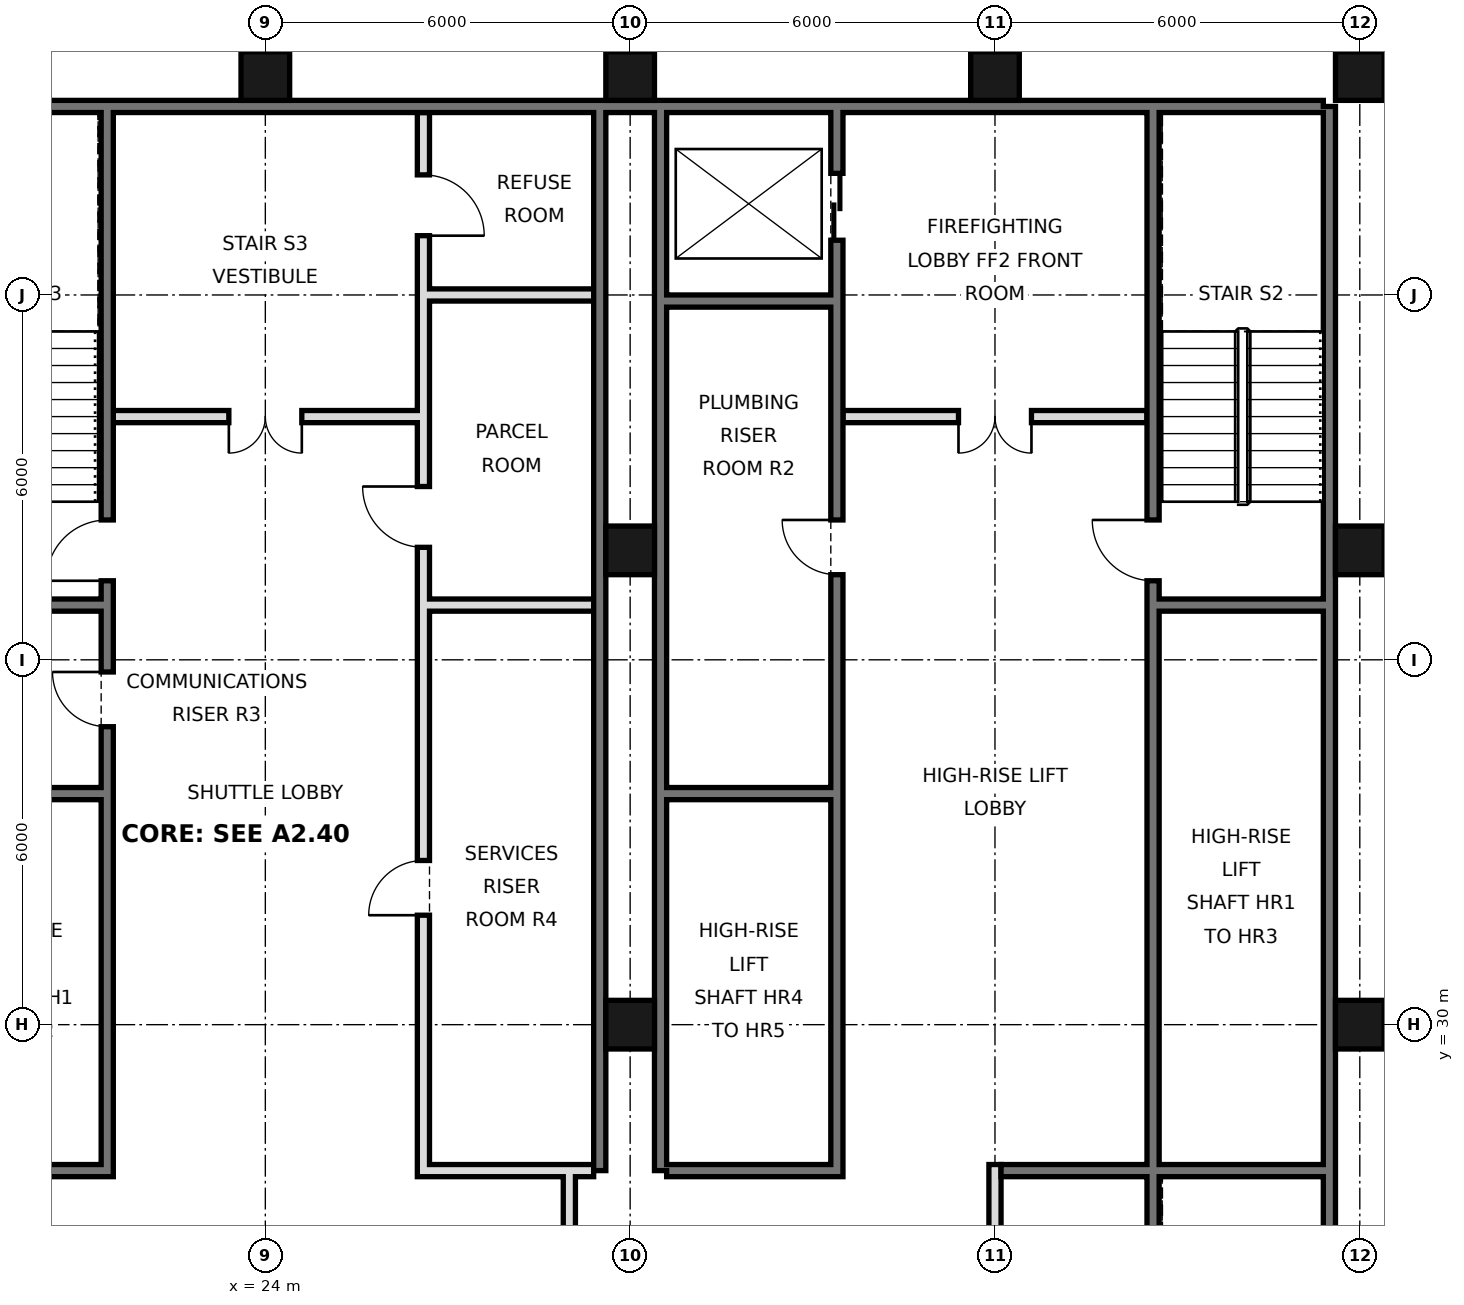
"""IFC4 building model, lengths in metres.
Left out: names, types, materials, properties, quantities, classifications, styles, units other than length and angle.
Written with IfcOpenShell. Run it as: python <this file> out.ifc"""

import sys

from ifc_helpers import new_model, si_unit, direction, frame, frame_2d, origin, origin_2d, place, context, subcontext, project, spatial, rectangle, hollow_rectangle, extrude, element, fill, save


model = new_model("IFC4")
c1 = context("Model", 3, precision=1e-05, world=origin(), true_north=direction((0.0, 1.0)))
c2 = subcontext(c1, "Body", "Model", "MODEL_VIEW")
j1 = project(units=[si_unit("LENGTHUNIT", "METRE"), si_unit("PLANEANGLEUNIT", "RADIAN")], contexts=[c1])
p1 = place(None, origin())
s1 = spatial("IfcSite", under=j1, at=p1, CompositionType="ELEMENT")
p2 = place(p1, origin())
s2 = spatial("IfcBuilding", under=s1, at=p2, CompositionType="ELEMENT")
p3 = place(p2, frame((0.0, 0.0, 158.2)))
s3 = spatial("IfcBuildingStorey", under=s2, at=p3, CompositionType="ELEMENT", Elevation=158.2)
for number, where, z_axis, x_axis in (
    (1, (24.0, 45.6, 0.0), (0.0, 0.0, 1.0), (1.0, 0.0, 0.0)),
    (2, (30.0, 30.0, 0.0), (0.0, 0.0, 1.0), (1.0, 0.0, 0.0)),
    (3, (30.0, 37.8, 0.0), (0.0, 0.0, 1.0), (1.0, 0.0, 0.0)),
    (4, (30.0, 45.6, 0.0), (0.0, 0.0, 1.0), (1.0, 0.0, 0.0)),
    (5, (36.0, 45.6, 0.0), (0.0, 0.0, 1.0), (1.0, 0.0, 0.0)),
    (6, (42.0, 30.0, 0.0), (0.0, 0.0, 1.0), (1.0, 0.0, 0.0)),
    (7, (42.0, 37.8, 0.0), (0.0, 0.0, 1.0), (1.0, 0.0, 0.0)),
    (8, (42.0, 45.6, 0.0), (0.0, 0.0, 1.0), (1.0, 0.0, 0.0)),
):
    element("IfcColumn", number, at=place(p3, frame(where, z_axis=z_axis, x_axis=x_axis)), inside=s3, PredefinedType="COLUMN", context=c2, shape_type="SweptSolid", body=[
        extrude(hollow_rectangle(XDim=0.8, YDim=0.8, WallThickness=0.045, at=origin_2d()), origin(), (0.0, 0.0, 1.0), 3.6),
    ])
p4 = place(p3, frame((41.5, 21.6, 0.0), z_axis=(0.0, 0.0, 1.0), x_axis=(0.0, 1.0, 0.0)))
e9 = element("IfcWall", 9, at=p4, inside=s3, PredefinedType="SOLIDWALL", context=c2, shape_type="SweptSolid", body=[
    extrude(rectangle(XDim=23.5, YDim=0.2, at=frame_2d((11.75, 0.0))), origin(), (0.0, 0.0, 1.0), 3.38),
])
p5 = place(p3, frame((6.6, 45.1, 0.0), z_axis=(0.0, 0.0, 1.0), x_axis=(1.0, 0.0, 0.0)))
e10 = element("IfcWall", 10, at=p5, inside=s3, PredefinedType="SOLIDWALL", context=c2, shape_type="SweptSolid", body=[
    extrude(rectangle(XDim=34.8, YDim=0.2, at=frame_2d((17.4, 0.0))), origin(), (0.0, 0.0, 1.0), 3.38),
])
for number, where, z_axis, x_axis in (
    (11, (29.5, 27.6, 0.0), (0.0, 0.0, 1.0), (0.0, 1.0, 0.0)),
    (12, (30.5, 27.6, 0.0), (0.0, 0.0, 1.0), (0.0, 1.0, 0.0)),
):
    element("IfcWall", number, at=place(p3, frame(where, z_axis=z_axis, x_axis=x_axis)), inside=s3, PredefinedType="SOLIDWALL", context=c2, shape_type="SweptSolid", body=[
        extrude(rectangle(XDim=17.5, YDim=0.2, at=frame_2d((8.75, 0.0))), origin(), (0.0, 0.0, 1.0), 3.38),
    ])
p6 = place(p3, frame((29.0, 21.6, 0.0), z_axis=(0.0, 0.0, 1.0), x_axis=(0.0, 1.0, 0.0)))
e13 = element("IfcWall", 13, at=p6, inside=s3, PredefinedType="PARTITIONING", context=c2, shape_type="SweptSolid", body=[
    extrude(rectangle(XDim=6.0, YDim=0.2, at=frame_2d((3.0, 0.0))), origin(), (0.0, 0.0, 1.0), 3.38),
])
p7 = place(p6, frame((2.1, 0.0, 0.0)))
e14 = element("IfcOpeningElement", 14, at=p7, cuts=e13, PredefinedType="OPENING", context=c2, shape_type="SweptSolid", body=[
    extrude(rectangle(XDim=1.8, YDim=2.1, at=frame_2d((0.9, 1.05))), frame((0.0, 0.11, 0.0), z_axis=(0.0, -1.0, 0.0), x_axis=(1.0, 0.0, 0.0)), (0.0, 0.0, 1.0), 0.22),
])
p8 = place(p3, frame((21.4, 27.5, 0.0), z_axis=(0.0, 0.0, 1.0), x_axis=(0.0, 1.0, 0.0)))
e15 = element("IfcWall", 15, at=p8, inside=s3, PredefinedType="SOLIDWALL", context=c2, shape_type="SweptSolid", body=[
    extrude(rectangle(XDim=17.5, YDim=0.2, at=frame_2d((8.75, 0.0))), origin(), (0.0, 0.0, 1.0), 3.38),
])
p9 = place(p8, frame((9.8, 0.0, 0.0)))
e16 = element("IfcOpeningElement", 16, at=p9, cuts=e15, PredefinedType="OPENING", context=c2, shape_type="SweptSolid", body=[
    extrude(rectangle(XDim=1.0, YDim=2.1, at=frame_2d((0.5, 1.05))), frame((0.0, 0.11, 0.0), z_axis=(0.0, -1.0, 0.0), x_axis=(1.0, 0.0, 0.0)), (0.0, 0.0, 1.0), 0.22),
])
p10 = place(p8, frame((7.4, 0.0, 0.0)))
e17 = element("IfcOpeningElement", 17, at=p10, cuts=e15, PredefinedType="OPENING", context=c2, shape_type="SweptSolid", body=[
    extrude(rectangle(XDim=0.9, YDim=2.1, at=frame_2d((0.45, 1.05))), frame((0.0, 0.11, 0.0), z_axis=(0.0, -1.0, 0.0), x_axis=(1.0, 0.0, 0.0)), (0.0, 0.0, 1.0), 0.22),
])
p11 = place(p3, frame((26.6, 27.5, 0.0), z_axis=(0.0, 0.0, 1.0), x_axis=(0.0, 1.0, 0.0)))
e18 = element("IfcWall", 18, at=p11, inside=s3, PredefinedType="SOLIDWALL", context=c2, shape_type="SweptSolid", body=[
    extrude(rectangle(XDim=17.5, YDim=0.2, at=frame_2d((8.75, 0.0))), origin(), (0.0, 0.0, 1.0), 3.38),
])
p12 = place(p11, frame((4.3, 0.0, 0.0)))
e19 = element("IfcOpeningElement", 19, at=p12, cuts=e18, PredefinedType="OPENING", context=c2, shape_type="SweptSolid", body=[
    extrude(rectangle(XDim=0.9, YDim=2.1, at=frame_2d((0.45, 1.05))), frame((0.0, 0.11, 0.0), z_axis=(0.0, -1.0, 0.0), x_axis=(1.0, 0.0, 0.0)), (0.0, 0.0, 1.0), 0.22),
])
p13 = place(p11, frame((10.35, 0.0, 0.0)))
e20 = element("IfcOpeningElement", 20, at=p13, cuts=e18, PredefinedType="OPENING", context=c2, shape_type="SweptSolid", body=[
    extrude(rectangle(XDim=1.0, YDim=2.1, at=frame_2d((0.5, 1.05))), frame((0.0, 0.11, 0.0), z_axis=(0.0, -1.0, 0.0), x_axis=(1.0, 0.0, 0.0)), (0.0, 0.0, 1.0), 0.22),
])
p14 = place(p11, frame((15.475, 0.0, 0.0)))
e21 = element("IfcOpeningElement", 21, at=p14, cuts=e18, PredefinedType="OPENING", context=c2, shape_type="SweptSolid", body=[
    extrude(rectangle(XDim=1.0, YDim=2.1, at=frame_2d((0.5, 1.05))), frame((0.0, 0.11, 0.0), z_axis=(0.0, -1.0, 0.0), x_axis=(1.0, 0.0, 0.0)), (0.0, 0.0, 1.0), 0.22),
])
p15 = place(p3, frame((33.4, 27.5, 0.0), z_axis=(0.0, 0.0, 1.0), x_axis=(0.0, 1.0, 0.0)))
e22 = element("IfcWall", 22, at=p15, inside=s3, PredefinedType="SOLIDWALL", context=c2, shape_type="SweptSolid", body=[
    extrude(rectangle(XDim=17.5, YDim=0.2, at=frame_2d((8.75, 0.0))), origin(), (0.0, 0.0, 1.0), 3.38),
])
p16 = place(p15, frame((15.4, 0.0, 0.0)))
e23 = element("IfcOpeningElement", 23, at=p16, cuts=e22, PredefinedType="OPENING", context=c2, shape_type="SweptSolid", body=[
    extrude(rectangle(XDim=1.1, YDim=2.1, at=frame_2d((0.55, 1.05))), frame((0.0, 0.11, 0.0), z_axis=(0.0, -1.0, 0.0), x_axis=(1.0, 0.0, 0.0)), (0.0, 0.0, 1.0), 0.22),
])
p17 = place(p15, frame((9.9, 0.0, 0.0)))
e24 = element("IfcOpeningElement", 24, at=p17, cuts=e22, PredefinedType="OPENING", context=c2, shape_type="SweptSolid", body=[
    extrude(rectangle(XDim=0.9, YDim=2.1, at=frame_2d((0.45, 1.05))), frame((0.0, 0.11, 0.0), z_axis=(0.0, -1.0, 0.0), x_axis=(1.0, 0.0, 0.0)), (0.0, 0.0, 1.0), 0.22),
])
p18 = place(p3, frame((36.0, 21.6, 0.0), z_axis=(0.0, 0.0, 1.0), x_axis=(0.0, 1.0, 0.0)))
e25 = element("IfcWall", 25, at=p18, inside=s3, PredefinedType="PARTITIONING", context=c2, shape_type="SweptSolid", body=[
    extrude(rectangle(XDim=6.1, YDim=0.2, at=frame_2d((3.05, 0.0))), origin(), (0.0, 0.0, 1.0), 3.38),
])
p19 = place(p3, frame((38.6, 21.6, 0.0), z_axis=(0.0, 0.0, 1.0), x_axis=(0.0, 1.0, 0.0)))
e26 = element("IfcWall", 26, at=p19, inside=s3, PredefinedType="SOLIDWALL", context=c2, shape_type="SweptSolid", body=[
    extrude(rectangle(XDim=23.4, YDim=0.2, at=frame_2d((11.7, 0.0))), origin(), (0.0, 0.0, 1.0), 3.38),
])
p20 = place(p19, frame((15.7, 0.0, 0.0)))
e27 = element("IfcOpeningElement", 27, at=p20, cuts=e26, PredefinedType="OPENING", context=c2, shape_type="SweptSolid", body=[
    extrude(rectangle(XDim=1.0, YDim=2.1, at=frame_2d((0.5, 1.05))), frame((0.0, 0.11, 0.0), z_axis=(0.0, -1.0, 0.0), x_axis=(1.0, 0.0, 0.0)), (0.0, 0.0, 1.0), 0.22),
])
p21 = place(p19, frame((0.175, 0.0, 0.0)))
e28 = element("IfcOpeningElement", 28, at=p21, cuts=e26, PredefinedType="OPENING", context=c2, shape_type="SweptSolid", body=[
    extrude(rectangle(XDim=0.9, YDim=2.1, at=frame_2d((0.45, 1.05))), frame((0.0, 0.11, 0.0), z_axis=(0.0, -1.0, 0.0), x_axis=(1.0, 0.0, 0.0)), (0.0, 0.0, 1.0), 0.22),
])
for number, where, z_axis, x_axis in (
    (29, (18.6, 27.6, 0.0), (0.0, 0.0, 1.0), (1.0, 0.0, 0.0)),
    (30, (26.7, 27.6, 0.0), (0.0, 0.0, 1.0), (1.0, 0.0, 0.0)),
    (31, (30.6, 27.6, 0.0), (0.0, 0.0, 1.0), (1.0, 0.0, 0.0)),
):
    element("IfcWall", number, at=place(p3, frame(where, z_axis=z_axis, x_axis=x_axis)), inside=s3, PredefinedType="SOLIDWALL", context=c2, shape_type="SweptSolid", body=[
        extrude(rectangle(XDim=2.7, YDim=0.2, at=frame_2d((1.35, 0.0))), origin(), (0.0, 0.0, 1.0), 3.38),
    ])
p22 = place(p3, frame((36.1, 27.6, 0.0), z_axis=(0.0, 0.0, 1.0), x_axis=(1.0, 0.0, 0.0)))
e32 = element("IfcWall", 32, at=p22, inside=s3, PredefinedType="SOLIDWALL", context=c2, shape_type="SweptSolid", body=[
    extrude(rectangle(XDim=5.3, YDim=0.2, at=frame_2d((2.65, 0.0))), origin(), (0.0, 0.0, 1.0), 3.38),
])
for number, where, z_axis, x_axis in (
    (33, (18.6, 33.8, 0.0), (0.0, 0.0, 1.0), (1.0, 0.0, 0.0)),
    (34, (30.6, 33.8, 0.0), (0.0, 0.0, 1.0), (1.0, 0.0, 0.0)),
    (35, (18.6, 36.9, 0.0), (0.0, 0.0, 1.0), (1.0, 0.0, 0.0)),
    (36, (26.7, 36.9, 0.0), (0.0, 0.0, 1.0), (1.0, 0.0, 0.0)),
    (37, (38.7, 36.9, 0.0), (0.0, 0.0, 1.0), (1.0, 0.0, 0.0)),
):
    element("IfcWall", number, at=place(p3, frame(where, z_axis=z_axis, x_axis=x_axis)), inside=s3, PredefinedType="SOLIDWALL", context=c2, shape_type="SweptSolid", body=[
        extrude(rectangle(XDim=2.7, YDim=0.2, at=frame_2d((1.35, 0.0))), origin(), (0.0, 0.0, 1.0), 3.38),
    ])
p23 = place(p3, frame((21.5, 40.0, 0.0), z_axis=(0.0, 0.0, 1.0), x_axis=(1.0, 0.0, 0.0)))
e38 = element("IfcWall", 38, at=p23, inside=s3, PredefinedType="PARTITIONING", context=c2, shape_type="SweptSolid", body=[
    extrude(rectangle(XDim=5.0, YDim=0.2, at=frame_2d((2.5, 0.0))), origin(), (0.0, 0.0, 1.0), 3.38),
])
p24 = place(p23, frame((1.9, 0.0, 0.0)))
e39 = element("IfcOpeningElement", 39, at=p24, cuts=e38, PredefinedType="OPENING", context=c2, shape_type="SweptSolid", body=[
    extrude(rectangle(XDim=1.2, YDim=2.1, at=frame_2d((0.6, 1.05))), frame((0.0, 0.11, 0.0), z_axis=(0.0, -1.0, 0.0), x_axis=(1.0, 0.0, 0.0)), (0.0, 0.0, 1.0), 0.22),
])
p25 = place(p3, frame((33.5, 40.0, 0.0), z_axis=(0.0, 0.0, 1.0), x_axis=(1.0, 0.0, 0.0)))
e40 = element("IfcWall", 40, at=p25, inside=s3, PredefinedType="PARTITIONING", context=c2, shape_type="SweptSolid", body=[
    extrude(rectangle(XDim=5.0, YDim=0.2, at=frame_2d((2.5, 0.0))), origin(), (0.0, 0.0, 1.0), 3.38),
])
p26 = place(p25, frame((1.9, 0.0, 0.0)))
e41 = element("IfcOpeningElement", 41, at=p26, cuts=e40, PredefinedType="OPENING", context=c2, shape_type="SweptSolid", body=[
    extrude(rectangle(XDim=1.2, YDim=2.1, at=frame_2d((0.6, 1.05))), frame((0.0, 0.11, 0.0), z_axis=(0.0, -1.0, 0.0), x_axis=(1.0, 0.0, 0.0)), (0.0, 0.0, 1.0), 0.22),
])
p27 = place(p3, frame((30.6, 41.9, 0.0), z_axis=(0.0, 0.0, 1.0), x_axis=(1.0, 0.0, 0.0)))
e42 = element("IfcWall", 42, at=p27, inside=s3, PredefinedType="SOLIDWALL", context=c2, shape_type="SweptSolid", body=[
    extrude(rectangle(XDim=2.7, YDim=0.2, at=frame_2d((1.35, 0.0))), origin(), (0.0, 0.0, 1.0), 3.38),
])
p28 = place(p3, frame((26.7, 42.0, 0.0), z_axis=(0.0, 0.0, 1.0), x_axis=(1.0, 0.0, 0.0)))
e43 = element("IfcWall", 43, at=p28, inside=s3, PredefinedType="PARTITIONING", context=c2, shape_type="SweptSolid", body=[
    extrude(rectangle(XDim=2.7, YDim=0.2, at=frame_2d((1.35, 0.0))), origin(), (0.0, 0.0, 1.0), 3.38),
])
p29 = place(p24, frame((1.2, 0.0, 0.0), z_axis=(0.0, 0.0, 1.0), x_axis=(-1.0, 0.0, 0.0)))
e44 = element("IfcDoor", 44, at=p29, inside=s3, OperationType="DOUBLE_DOOR_SINGLE_SWING", PredefinedType="DOOR", context=c2, shape_type="SweptSolid", body=[
    extrude(rectangle(XDim=1.2, YDim=2.1, at=frame_2d((0.6, 1.05))), frame((0.0, 0.025, 0.0), z_axis=(0.0, -1.0, 0.0), x_axis=(1.0, 0.0, 0.0)), (0.0, 0.0, 1.0), 0.05),
])
fill(e39, e44)
p30 = place(p26, frame((1.2, 0.0, 0.0), z_axis=(0.0, 0.0, 1.0), x_axis=(-1.0, 0.0, 0.0)))
e45 = element("IfcDoor", 45, at=p30, inside=s3, OperationType="DOUBLE_DOOR_SINGLE_SWING", PredefinedType="DOOR", context=c2, shape_type="SweptSolid", body=[
    extrude(rectangle(XDim=1.2, YDim=2.1, at=frame_2d((0.6, 1.05))), frame((0.0, 0.025, 0.0), z_axis=(0.0, -1.0, 0.0), x_axis=(1.0, 0.0, 0.0)), (0.0, 0.0, 1.0), 0.05),
])
fill(e41, e45)
p31 = place(p16, origin())
e46 = element("IfcDoor", 46, at=p31, inside=s3, OperationType="DOUBLE_DOOR_SLIDING", PredefinedType="DOOR", context=c2, shape_type="SweptSolid", body=[
    extrude(rectangle(XDim=1.1, YDim=2.1, at=frame_2d((0.55, 1.05))), frame((0.0, 0.025, 0.0), z_axis=(0.0, -1.0, 0.0), x_axis=(1.0, 0.0, 0.0)), (0.0, 0.0, 1.0), 0.05),
])
fill(e23, e46)
p32 = place(p20, frame((1.0, 0.0, 0.0), z_axis=(0.0, 0.0, 1.0), x_axis=(-1.0, 0.0, 0.0)))
e47 = element("IfcDoor", 47, at=p32, inside=s3, OperationType="SINGLE_SWING_LEFT", PredefinedType="DOOR", context=c2, shape_type="SweptSolid", body=[
    extrude(rectangle(XDim=1.0, YDim=2.1, at=frame_2d((0.5, 1.05))), frame((0.0, 0.025, 0.0), z_axis=(0.0, -1.0, 0.0), x_axis=(1.0, 0.0, 0.0)), (0.0, 0.0, 1.0), 0.05),
])
fill(e27, e47)
p33 = place(p9, origin())
e48 = element("IfcDoor", 48, at=p33, inside=s3, OperationType="SINGLE_SWING_LEFT", PredefinedType="DOOR", context=c2, shape_type="SweptSolid", body=[
    extrude(rectangle(XDim=1.0, YDim=2.1, at=frame_2d((0.5, 1.05))), frame((0.0, 0.025, 0.0), z_axis=(0.0, -1.0, 0.0), x_axis=(1.0, 0.0, 0.0)), (0.0, 0.0, 1.0), 0.05),
])
fill(e16, e48)
p34 = place(p17, frame((0.9, 0.0, 0.0), z_axis=(0.0, 0.0, 1.0), x_axis=(-1.0, 0.0, 0.0)))
e49 = element("IfcDoor", 49, at=p34, inside=s3, OperationType="SINGLE_SWING_LEFT", PredefinedType="DOOR", context=c2, shape_type="SweptSolid", body=[
    extrude(rectangle(XDim=0.9, YDim=2.1, at=frame_2d((0.45, 1.05))), frame((0.0, 0.025, 0.0), z_axis=(0.0, -1.0, 0.0), x_axis=(1.0, 0.0, 0.0)), (0.0, 0.0, 1.0), 0.05),
])
fill(e24, e49)
p35 = place(p10, frame((0.9, 0.0, 0.0), z_axis=(0.0, 0.0, 1.0), x_axis=(-1.0, 0.0, 0.0)))
e50 = element("IfcDoor", 50, at=p35, inside=s3, OperationType="SINGLE_SWING_LEFT", PredefinedType="DOOR", context=c2, shape_type="SweptSolid", body=[
    extrude(rectangle(XDim=0.9, YDim=2.1, at=frame_2d((0.45, 1.05))), frame((0.0, 0.025, 0.0), z_axis=(0.0, -1.0, 0.0), x_axis=(1.0, 0.0, 0.0)), (0.0, 0.0, 1.0), 0.05),
])
fill(e17, e50)
p36 = place(p12, origin())
e51 = element("IfcDoor", 51, at=p36, inside=s3, OperationType="SINGLE_SWING_LEFT", PredefinedType="DOOR", context=c2, shape_type="SweptSolid", body=[
    extrude(rectangle(XDim=0.9, YDim=2.1, at=frame_2d((0.45, 1.05))), frame((0.0, 0.025, 0.0), z_axis=(0.0, -1.0, 0.0), x_axis=(1.0, 0.0, 0.0)), (0.0, 0.0, 1.0), 0.05),
])
fill(e19, e51)
p37 = place(p13, frame((1.0, 0.0, 0.0), z_axis=(0.0, 0.0, 1.0), x_axis=(-1.0, 0.0, 0.0)))
e52 = element("IfcDoor", 52, at=p37, inside=s3, OperationType="SINGLE_SWING_LEFT", PredefinedType="DOOR", context=c2, shape_type="SweptSolid", body=[
    extrude(rectangle(XDim=1.0, YDim=2.1, at=frame_2d((0.5, 1.05))), frame((0.0, 0.025, 0.0), z_axis=(0.0, -1.0, 0.0), x_axis=(1.0, 0.0, 0.0)), (0.0, 0.0, 1.0), 0.05),
])
fill(e20, e52)
p38 = place(p14, frame((1.0, 0.0, 0.0), z_axis=(0.0, 0.0, 1.0), x_axis=(-1.0, 0.0, 0.0)))
e53 = element("IfcDoor", 53, at=p38, inside=s3, OperationType="SINGLE_SWING_RIGHT", PredefinedType="DOOR", context=c2, shape_type="SweptSolid", body=[
    extrude(rectangle(XDim=1.0, YDim=2.1, at=frame_2d((0.5, 1.05))), frame((0.0, 0.025, 0.0), z_axis=(0.0, -1.0, 0.0), x_axis=(1.0, 0.0, 0.0)), (0.0, 0.0, 1.0), 0.05),
])
fill(e21, e53)
save(model, sys.argv[1])
